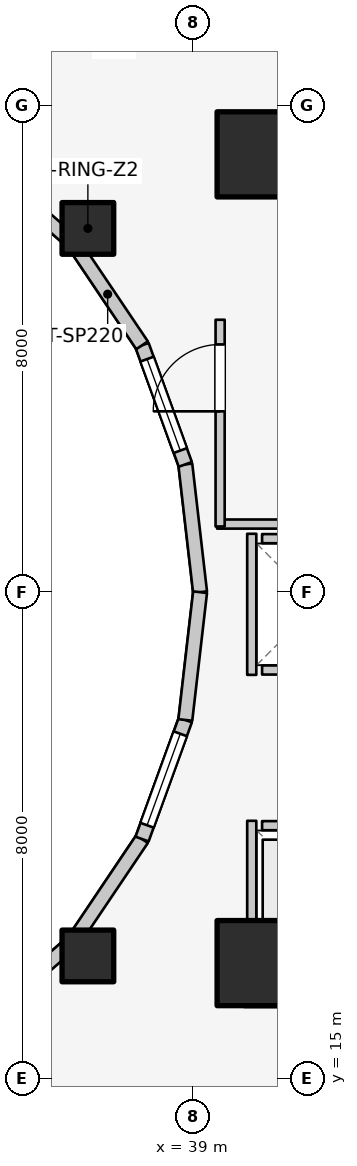
"""IFC4 building model, lengths in metres.
Left out: names, types, materials, properties, quantities, classifications, styles, units other than length and angle.
Written with IfcOpenShell. Run it as: python <this file> out.ifc"""

import sys

from ifc_helpers import new_model, si_unit, direction, frame, frame_2d, origin, origin_2d, place, context, subcontext, project, spatial, rectangle, extrude, element, fill, save


model = new_model("IFC4")
c1 = context("Model", 3, precision=1e-05, world=origin(), true_north=direction((0.0, 1.0)))
c2 = subcontext(c1, "Body", "Model", "MODEL_VIEW")
j1 = project(units=[si_unit("LENGTHUNIT", "METRE"), si_unit("PLANEANGLEUNIT", "RADIAN")], contexts=[c1])
p1 = place(None, origin())
s1 = spatial("IfcSite", under=j1, at=p1, CompositionType="ELEMENT")
p2 = place(p1, origin())
s2 = spatial("IfcBuilding", under=s1, at=p2, CompositionType="ELEMENT")
p3 = place(p2, frame((0.0, 0.0, 98.0)))
s3 = spatial("IfcBuildingStorey", under=s2, at=p3, CompositionType="ELEMENT", Elevation=98.0)
for number, where, z_axis, x_axis in (
    (1, (39.85, 16.55, 0.0), (0.0, 0.0, 1.0), (1.0, 0.0, 0.0)),
    (2, (39.85, 30.35, 0.0), (0.0, 0.0, 1.0), (1.0, 0.0, 0.0)),
):
    element("IfcWall", number, at=place(p3, frame(where, z_axis=z_axis, x_axis=x_axis)), inside=s3, PredefinedType="SHEAR", context=c2, shape_type="SweptSolid", body=[
        extrude(rectangle(XDim=4.5, YDim=0.7, at=frame_2d((2.25, 0.0))), origin(), (0.0, 0.0, 1.0), 3.1),
    ])
for number, where, z_axis, x_axis in (
    (3, (40.1, 16.9, 0.0), (0.0, 0.0, 1.0), (1.0, 0.0, 0.0)),
    (4, (40.1, 30.2, 0.0), (0.0, 0.0, 1.0), (1.0, 0.0, 0.0)),
):
    element("IfcColumn", number, at=place(p3, frame(where, z_axis=z_axis, x_axis=x_axis)), inside=s3, PredefinedType="COLUMN", context=c2, shape_type="SweptSolid", body=[
        extrude(rectangle(XDim=1.4, YDim=1.4, at=origin_2d()), origin(), (0.0, 0.0, 1.0), 3.1),
    ])
for number, where, z_axis, x_axis in (
    (5, (37.275, 28.982, 0.0), (0.0, 0.0, 1.0), (1.0, 0.0, 0.0)),
    (6, (37.275, 17.018, 0.0), (0.0, 0.0, 1.0), (1.0, 0.0, 0.0)),
):
    element("IfcColumn", number, at=place(p3, frame(where, z_axis=z_axis, x_axis=x_axis)), inside=s3, PredefinedType="COLUMN", context=c2, shape_type="SweptSolid", body=[
        extrude(rectangle(XDim=0.85, YDim=0.85, at=origin_2d()), origin(), (0.0, 0.0, 1.0), 3.1),
    ])
p4 = place(p3, frame((39.12, 23.0, 0.0), z_axis=(0.0, 0.0, 1.0), x_axis=(-0.114711713601, 0.993398823617, 0.0)))
e7 = element("IfcWall", 7, at=p4, inside=s3, PredefinedType="STANDARD", context=c2, shape_type="SweptSolid", body=[
    extrude(rectangle(XDim=2.115, YDim=0.23, at=frame_2d((1.058, 0.0))), origin(), (0.0, 0.0, 1.0), 2.84),
])
p5 = place(p3, frame((38.877, 25.102, 0.0), z_axis=(0.0, 0.0, 1.0), x_axis=(-0.341423187295, 0.93990968033, 0.0)))
e8 = element("IfcWall", 8, at=p5, inside=s3, PredefinedType="STANDARD", context=c2, shape_type="SweptSolid", body=[
    extrude(rectangle(XDim=2.084, YDim=0.23, at=frame_2d((1.042, 0.0))), origin(), (0.0, 0.0, 1.0), 2.84),
])
p6 = place(p5, frame((0.242, 0.0, 0.85)))
e9 = element("IfcOpeningElement", 9, at=p6, cuts=e8, PredefinedType="OPENING", context=c2, shape_type="SweptSolid", body=[
    extrude(rectangle(XDim=1.6, YDim=1.65, at=frame_2d((0.8, 0.825))), frame((0.0, 0.125, 0.0), z_axis=(0.0, -1.0, 0.0), x_axis=(1.0, 0.0, 0.0)), (0.0, 0.0, 1.0), 0.25),
])
p7 = place(p3, frame((38.166, 27.06, 0.0), z_axis=(0.0, 0.0, 1.0), x_axis=(-0.558197800898, 0.829707909492, 0.0)))
e10 = element("IfcWall", 10, at=p7, inside=s3, PredefinedType="STANDARD", context=c2, shape_type="SweptSolid", body=[
    extrude(rectangle(XDim=2.027, YDim=0.23, at=frame_2d((1.013, 0.0))), origin(), (0.0, 0.0, 1.0), 2.16),
])
for number, where, z_axis, x_axis in (
    (11, (37.035, 28.742, 0.0), (0.0, 0.0, 1.0), (-0.753, 0.659, 0.0)),
    (12, (35.56, 15.968, 0.0), (0.0, 0.0, 1.0), (0.753, 0.659, 0.0)),
):
    element("IfcWall", number, at=place(p3, frame(where, z_axis=z_axis, x_axis=x_axis)), inside=s3, PredefinedType="STANDARD", context=c2, shape_type="SweptSolid", body=[
        extrude(rectangle(XDim=1.959, YDim=0.23, at=frame_2d((0.98, 0.0))), origin(), (0.0, 0.0, 1.0), 2.16),
    ])
p8 = place(p3, frame((37.035, 17.258, 0.0), z_axis=(0.0, 0.0, 1.0), x_axis=(0.558197800898, 0.829707909492, 0.0)))
e13 = element("IfcWall", 13, at=p8, inside=s3, PredefinedType="STANDARD", context=c2, shape_type="SweptSolid", body=[
    extrude(rectangle(XDim=2.027, YDim=0.23, at=frame_2d((1.013, 0.0))), origin(), (0.0, 0.0, 1.0), 2.16),
])
p9 = place(p3, frame((38.166, 18.94, 0.0), z_axis=(0.0, 0.0, 1.0), x_axis=(0.341423187295, 0.93990968033, 0.0)))
e14 = element("IfcWall", 14, at=p9, inside=s3, PredefinedType="STANDARD", context=c2, shape_type="SweptSolid", body=[
    extrude(rectangle(XDim=2.084, YDim=0.23, at=frame_2d((1.042, 0.0))), origin(), (0.0, 0.0, 1.0), 2.84),
])
p10 = place(p9, frame((0.242, 0.0, 0.85)))
e15 = element("IfcOpeningElement", 15, at=p10, cuts=e14, PredefinedType="OPENING", context=c2, shape_type="SweptSolid", body=[
    extrude(rectangle(XDim=1.6, YDim=1.65, at=frame_2d((0.8, 0.825))), frame((0.0, 0.125, 0.0), z_axis=(0.0, -1.0, 0.0), x_axis=(1.0, 0.0, 0.0)), (0.0, 0.0, 1.0), 0.25),
])
p11 = place(p3, frame((38.877, 20.898, 0.0), z_axis=(0.0, 0.0, 1.0), x_axis=(0.114711713601, 0.993398823617, 0.0)))
e16 = element("IfcWall", 16, at=p11, inside=s3, PredefinedType="STANDARD", context=c2, shape_type="SweptSolid", body=[
    extrude(rectangle(XDim=2.115, YDim=0.23, at=frame_2d((1.058, 0.0))), origin(), (0.0, 0.0, 1.0), 2.84),
])
p12 = place(p3, frame((40.14, 19.16, 0.0), z_axis=(0.0, 0.0, 1.0), x_axis=(1.0, 0.0, 0.0)))
e17 = element("IfcWall", 17, at=p12, inside=s3, PredefinedType="SOLIDWALL", context=c2, shape_type="SweptSolid", body=[
    extrude(rectangle(XDim=1.82, YDim=0.15, at=frame_2d((0.91, 0.0))), origin(), (0.0, 0.0, 1.0), 2.12),
])
p13 = place(p12, frame((0.36, 0.0, 0.0)))
e18 = element("IfcOpeningElement", 18, at=p13, cuts=e17, PredefinedType="OPENING", context=c2, shape_type="SweptSolid", body=[
    extrude(rectangle(XDim=1.1, YDim=2.1, at=frame_2d((0.55, 1.05))), frame((0.0, 0.085, 0.0), z_axis=(0.0, -1.0, 0.0), x_axis=(1.0, 0.0, 0.0)), (0.0, 0.0, 1.0), 0.17),
])
p14 = place(p3, frame((40.14, 17.1, 0.0), z_axis=(0.0, 0.0, 1.0), x_axis=(1.0, 0.0, 0.0)))
e19 = element("IfcWall", 19, at=p14, inside=s3, PredefinedType="SOLIDWALL", context=c2, shape_type="SweptSolid", body=[
    extrude(rectangle(XDim=1.82, YDim=0.15, at=frame_2d((0.91, 0.0))), origin(), (0.0, 0.0, 1.0), 2.12),
])
p15 = place(p3, frame((39.97, 17.02, 0.0), z_axis=(0.0, 0.0, 1.0), x_axis=(0.0, 1.0, 0.0)))
e20 = element("IfcWall", 20, at=p15, inside=s3, PredefinedType="SOLIDWALL", context=c2, shape_type="SweptSolid", body=[
    extrude(rectangle(XDim=2.22, YDim=0.15, at=frame_2d((1.11, 0.0))), origin(), (0.0, 0.0, 1.0), 2.12),
])
for number, where, z_axis, x_axis in (
    (21, (40.14, 21.72, 0.0), (0.0, 0.0, 1.0), (1.0, 0.0, 0.0)),
    (22, (40.14, 23.88, 0.0), (0.0, 0.0, 1.0), (1.0, 0.0, 0.0)),
):
    element("IfcWall", number, at=place(p3, frame(where, z_axis=z_axis, x_axis=x_axis)), inside=s3, PredefinedType="SOLIDWALL", context=c2, shape_type="SweptSolid", body=[
        extrude(rectangle(XDim=1.82, YDim=0.15, at=frame_2d((0.91, 0.0))), origin(), (0.0, 0.0, 1.0), 2.12),
    ])
p16 = place(p3, frame((39.97, 21.64, 0.0), z_axis=(0.0, 0.0, 1.0), x_axis=(0.0, 1.0, 0.0)))
e23 = element("IfcWall", 23, at=p16, inside=s3, PredefinedType="SOLIDWALL", context=c2, shape_type="SweptSolid", body=[
    extrude(rectangle(XDim=2.32, YDim=0.15, at=frame_2d((1.16, 0.0))), origin(), (0.0, 0.0, 1.0), 2.12),
])
p17 = place(p3, frame((39.4, 24.12, 0.0), z_axis=(0.0, 0.0, 1.0), x_axis=(1.0, 0.0, 0.0)))
e24 = element("IfcWall", 24, at=p17, inside=s3, PredefinedType="PARTITIONING", context=c2, shape_type="SweptSolid", body=[
    extrude(rectangle(XDim=5.08, YDim=0.15, at=frame_2d((2.54, 0.0))), origin(), (0.0, 0.0, 1.0), 2.12),
])
p18 = place(p3, frame((39.45, 24.08, 0.0), z_axis=(0.0, 0.0, 1.0), x_axis=(0.0, 1.0, 0.0)))
e25 = element("IfcWall", 25, at=p18, inside=s3, PredefinedType="PARTITIONING", context=c2, shape_type="SweptSolid", body=[
    extrude(rectangle(XDim=3.4, YDim=0.15, at=frame_2d((1.7, 0.0))), origin(), (0.0, 0.0, 1.0), 2.855),
])
p19 = place(p18, frame((1.894, 0.0, 0.0)))
e26 = element("IfcOpeningElement", 26, at=p19, cuts=e25, PredefinedType="OPENING", context=c2, shape_type="SweptSolid", body=[
    extrude(rectangle(XDim=1.1, YDim=2.1, at=frame_2d((0.55, 1.05))), frame((0.0, 0.085, 0.0), z_axis=(0.0, -1.0, 0.0), x_axis=(1.0, 0.0, 0.0)), (0.0, 0.0, 1.0), 0.17),
])
p20 = place(p6, origin())
e27 = element("IfcWindow", 27, at=p20, inside=s3, PartitioningType="SINGLE_PANEL", PredefinedType="WINDOW", context=c2, shape_type="SweptSolid", body=[
    extrude(rectangle(XDim=1.6, YDim=1.65, at=frame_2d((0.8, 0.825))), frame((0.0, 0.03, 0.0), z_axis=(0.0, -1.0, 0.0), x_axis=(1.0, 0.0, 0.0)), (0.0, 0.0, 1.0), 0.06),
])
fill(e9, e27)
p21 = place(p10, origin())
e28 = element("IfcWindow", 28, at=p21, inside=s3, PartitioningType="SINGLE_PANEL", PredefinedType="WINDOW", context=c2, shape_type="SweptSolid", body=[
    extrude(rectangle(XDim=1.6, YDim=1.65, at=frame_2d((0.8, 0.825))), frame((0.0, 0.03, 0.0), z_axis=(0.0, -1.0, 0.0), x_axis=(1.0, 0.0, 0.0)), (0.0, 0.0, 1.0), 0.06),
])
fill(e15, e28)
p22 = place(p19, origin())
e29 = element("IfcDoor", 29, at=p22, inside=s3, OperationType="SINGLE_SWING_LEFT", PredefinedType="DOOR", context=c2, shape_type="SweptSolid", body=[
    extrude(rectangle(XDim=1.1, YDim=2.1, at=frame_2d((0.55, 1.05))), frame((0.0, 0.025, 0.0), z_axis=(0.0, -1.0, 0.0), x_axis=(1.0, 0.0, 0.0)), (0.0, 0.0, 1.0), 0.05),
])
fill(e26, e29)
save(model, sys.argv[1])
